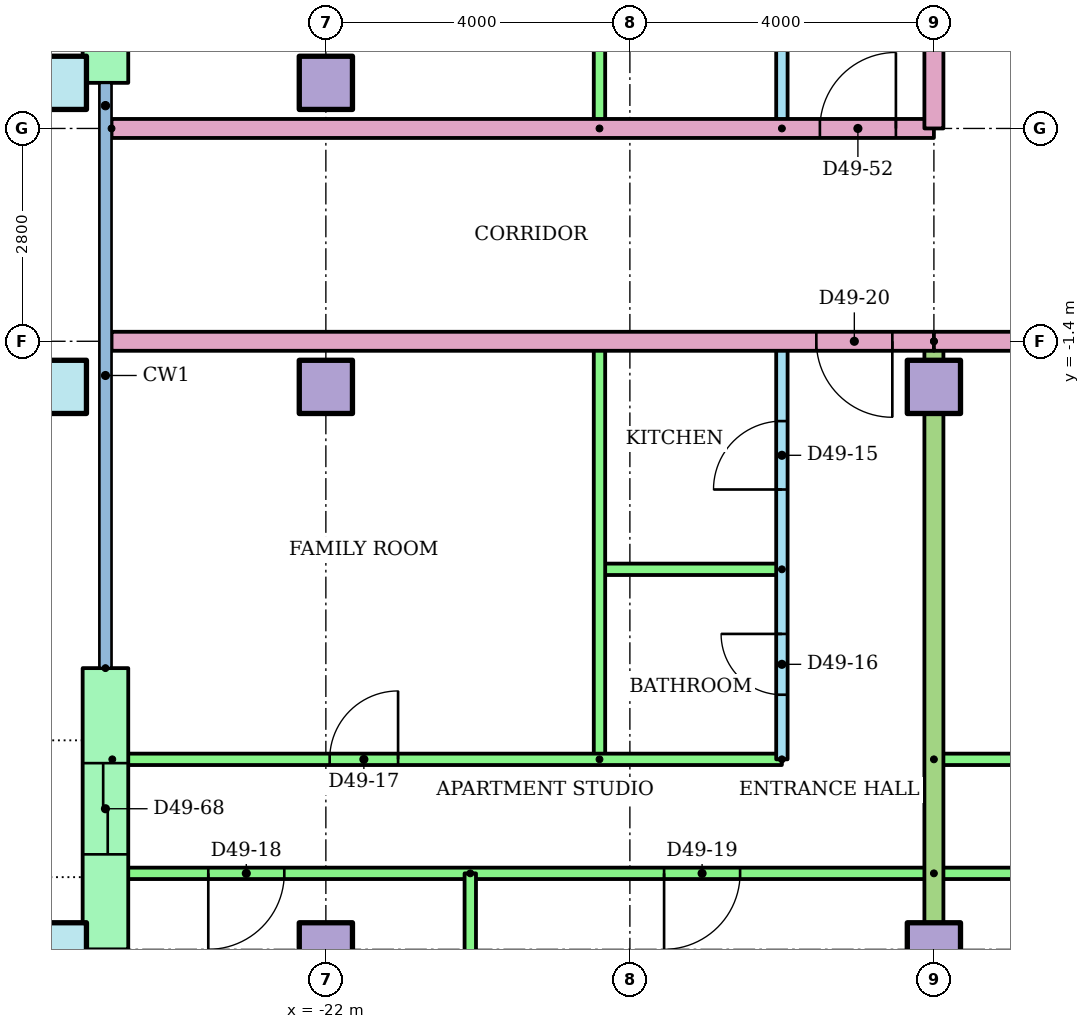
"""IFC4 building model, lengths in metres.
Left out: names, types, materials, properties, quantities, classifications, styles, units other than length and angle.
Written with IfcOpenShell. Run it as: python <this file> out.ifc"""

import sys

from ifc_helpers import new_model, si_unit, direction, frame, frame_2d, origin, origin_2d, place, context, subcontext, project, spatial, rectangle, hollow_rectangle, extrude, element, fill, save


model = new_model("IFC4")
c1 = context("Model", 3, precision=1e-05, world=origin(), true_north=direction((0.0, 1.0)))
c2 = subcontext(c1, "Body", "Model", "MODEL_VIEW")
j1 = project(units=[si_unit("LENGTHUNIT", "METRE"), si_unit("PLANEANGLEUNIT", "RADIAN")], contexts=[c1])
p1 = place(None, origin())
s1 = spatial("IfcSite", under=j1, at=p1, CompositionType="ELEMENT")
p2 = place(p1, origin())
s2 = spatial("IfcBuilding", under=s1, at=p2, CompositionType="ELEMENT")
p3 = place(p2, frame((0.0, 0.0, 187.7)))
s3 = spatial("IfcBuildingStorey", under=s2, at=p3, CompositionType="ELEMENT", Elevation=187.7)
p4 = place(p3, frame((-25.5, -9.4, 0.0)))
e1 = element("IfcColumn", 1, at=p4, inside=s3, PredefinedType="COLUMN", context=c2, shape_type="SweptSolid", body=[
    extrude(hollow_rectangle(XDim=0.7, YDim=0.7, WallThickness=0.036, at=origin_2d()), origin(), (0.0, 0.0, 1.0), 3.2),
])
for number, where in (
    (2, (-22.0, -9.4, 0.0)),
    (3, (-14.0, -9.4, 0.0)),
):
    element("IfcColumn", number, at=place(p3, frame(where)), inside=s3, PredefinedType="COLUMN", context=c2, shape_type="SweptSolid", body=[
        extrude(rectangle(XDim=0.7, YDim=0.7, at=origin_2d()), origin(), (0.0, 0.0, 1.0), 3.2),
    ])
p5 = place(p3, frame((-25.5, -2.0, 0.0)))
e4 = element("IfcColumn", 4, at=p5, inside=s3, PredefinedType="COLUMN", context=c2, shape_type="SweptSolid", body=[
    extrude(hollow_rectangle(XDim=0.7, YDim=0.7, WallThickness=0.036, at=origin_2d()), origin(), (0.0, 0.0, 1.0), 3.2),
])
for number, where in (
    (5, (-22.0, -2.0, 0.0)),
    (6, (-14.0, -2.0, 0.0)),
):
    element("IfcColumn", number, at=place(p3, frame(where)), inside=s3, PredefinedType="COLUMN", context=c2, shape_type="SweptSolid", body=[
        extrude(rectangle(XDim=0.7, YDim=0.7, at=origin_2d()), origin(), (0.0, 0.0, 1.0), 3.2),
    ])
p6 = place(p3, frame((-25.5, 2.0, 0.0)))
e7 = element("IfcColumn", 7, at=p6, inside=s3, PredefinedType="COLUMN", context=c2, shape_type="SweptSolid", body=[
    extrude(hollow_rectangle(XDim=0.7, YDim=0.7, WallThickness=0.036, at=origin_2d()), origin(), (0.0, 0.0, 1.0), 3.2),
])
p7 = place(p3, frame((-22.0, 2.0, 0.0)))
e8 = element("IfcColumn", 8, at=p7, inside=s3, PredefinedType="COLUMN", context=c2, shape_type="SweptSolid", body=[
    extrude(rectangle(XDim=0.7, YDim=0.7, at=origin_2d()), origin(), (0.0, 0.0, 1.0), 3.2),
])
p8 = place(p3, frame((-24.9, 6.5, 0.0), z_axis=(0.0, 0.0, 1.0), x_axis=(0.0, -1.0, 0.0)))
e9 = element("IfcWall", 9, at=p8, inside=s3, PredefinedType="STANDARD", context=c2, shape_type="SweptSolid", body=[
    extrude(rectangle(XDim=4.5, YDim=0.6, at=frame_2d((2.25, 0.0))), origin(), (0.0, 0.0, 1.0), 2.92),
])
p9 = place(p8, frame((1.65, 0.0, 0.0)))
e10 = element("IfcOpeningElement", 10, at=p9, cuts=e9, PredefinedType="OPENING", context=c2, shape_type="SweptSolid", body=[
    extrude(rectangle(XDim=1.2, YDim=2.1, at=frame_2d((0.6, 1.05))), frame((0.0, 0.31, 0.0), z_axis=(0.0, -1.0, 0.0), x_axis=(1.0, 0.0, 0.0)), (0.0, 0.0, 1.0), 0.62),
])
p10 = place(p3, frame((-24.9, -5.7, 0.0), z_axis=(0.0, 0.0, 1.0), x_axis=(0.0, -1.0, 0.0)))
e11 = element("IfcWall", 11, at=p10, inside=s3, PredefinedType="STANDARD", context=c2, shape_type="SweptSolid", body=[
    extrude(rectangle(XDim=3.7, YDim=0.6, at=frame_2d((1.85, 0.0))), origin(), (0.0, 0.0, 1.0), 2.92),
])
p11 = place(p10, frame((1.25, 0.0, 0.0)))
e12 = element("IfcOpeningElement", 12, at=p11, cuts=e11, PredefinedType="OPENING", context=c2, shape_type="SweptSolid", body=[
    extrude(rectangle(XDim=1.2, YDim=2.1, at=frame_2d((0.6, 1.05))), frame((0.0, 0.31, 0.0), z_axis=(0.0, -1.0, 0.0), x_axis=(1.0, 0.0, 0.0)), (0.0, 0.0, 1.0), 0.62),
])
p12 = place(p3, frame((-16.0, -6.9, 0.0), z_axis=(0.0, 0.0, 1.0), x_axis=(0.0, 1.0, 0.0)))
e13 = element("IfcWall", 13, at=p12, inside=s3, PredefinedType="PARTITIONING", context=c2, shape_type="SweptSolid", body=[
    extrude(rectangle(XDim=5.5, YDim=0.15, at=frame_2d((2.75, 0.0))), origin(), (0.0, 0.0, 1.0), 2.4),
])
p13 = place(p12, frame((3.55, 0.0, 0.0)))
e14 = element("IfcOpeningElement", 14, at=p13, cuts=e13, PredefinedType="OPENING", context=c2, shape_type="SweptSolid", body=[
    extrude(rectangle(XDim=0.9, YDim=2.1, at=frame_2d((0.45, 1.05))), frame((0.0, 0.085, 0.0), z_axis=(0.0, -1.0, 0.0), x_axis=(1.0, 0.0, 0.0)), (0.0, 0.0, 1.0), 0.17),
])
p14 = place(p12, frame((0.85, 0.0, 0.0)))
e15 = element("IfcOpeningElement", 15, at=p14, cuts=e13, PredefinedType="OPENING", context=c2, shape_type="SweptSolid", body=[
    extrude(rectangle(XDim=0.8, YDim=2.1, at=frame_2d((0.4, 1.05))), frame((0.0, 0.085, 0.0), z_axis=(0.0, -1.0, 0.0), x_axis=(1.0, 0.0, 0.0)), (0.0, 0.0, 1.0), 0.17),
])
p15 = place(p3, frame((-16.0, -4.4, 0.0), z_axis=(0.0, 0.0, 1.0), x_axis=(-1.0, 0.0, 0.0)))
e16 = element("IfcWall", 16, at=p15, inside=s3, PredefinedType="PARTITIONING", context=c2, shape_type="SweptSolid", body=[
    extrude(rectangle(XDim=2.4, YDim=0.15, at=frame_2d((1.2, 0.0))), origin(), (0.0, 0.0, 1.0), 2.4),
])
p16 = place(p3, frame((-18.4, -6.9, 0.0), z_axis=(0.0, 0.0, 1.0), x_axis=(0.0, 1.0, 0.0)))
e17 = element("IfcWall", 17, at=p16, inside=s3, PredefinedType="PARTITIONING", context=c2, shape_type="SweptSolid", body=[
    extrude(rectangle(XDim=5.5, YDim=0.15, at=frame_2d((2.75, 0.0))), origin(), (0.0, 0.0, 1.0), 2.4),
])
p17 = place(p3, frame((-24.81, -6.9, 0.0)))
e18 = element("IfcWall", 18, at=p17, inside=s3, PredefinedType="PARTITIONING", context=c2, shape_type="SweptSolid", body=[
    extrude(rectangle(XDim=8.81, YDim=0.15, at=frame_2d((4.405, 0.0))), origin(), (0.0, 0.0, 1.0), 2.4),
])
p18 = place(p17, frame((2.86, 0.0, 0.0)))
e19 = element("IfcOpeningElement", 19, at=p18, cuts=e18, PredefinedType="OPENING", context=c2, shape_type="SweptSolid", body=[
    extrude(rectangle(XDim=0.9, YDim=2.1, at=frame_2d((0.45, 1.05))), frame((0.0, 0.085, 0.0), z_axis=(0.0, -1.0, 0.0), x_axis=(1.0, 0.0, 0.0)), (0.0, 0.0, 1.0), 0.17),
])
p19 = place(p3, frame((-14.0, -8.4, 0.0), z_axis=(0.0, 0.0, 1.0), x_axis=(-1.0, 0.0, 0.0)))
e20 = element("IfcWall", 20, at=p19, inside=s3, PredefinedType="PARTITIONING", context=c2, shape_type="SweptSolid", body=[
    extrude(rectangle(XDim=10.81, YDim=0.15, at=frame_2d((5.405, 0.0))), origin(), (0.0, 0.0, 1.0), 2.4),
])
p20 = place(p19, frame((8.547, 0.0, 0.0)))
e21 = element("IfcOpeningElement", 21, at=p20, cuts=e20, PredefinedType="OPENING", context=c2, shape_type="SweptSolid", body=[
    extrude(rectangle(XDim=1.0, YDim=2.1, at=frame_2d((0.5, 1.05))), frame((0.0, 0.085, 0.0), z_axis=(0.0, -1.0, 0.0), x_axis=(1.0, 0.0, 0.0)), (0.0, 0.0, 1.0), 0.17),
])
p21 = place(p19, frame((2.55, 0.0, 0.0)))
e22 = element("IfcOpeningElement", 22, at=p21, cuts=e20, PredefinedType="OPENING", context=c2, shape_type="SweptSolid", body=[
    extrude(rectangle(XDim=1.0, YDim=2.1, at=frame_2d((0.5, 1.05))), frame((0.0, 0.085, 0.0), z_axis=(0.0, -1.0, 0.0), x_axis=(1.0, 0.0, 0.0)), (0.0, 0.0, 1.0), 0.17),
])
p22 = place(p3, frame((-20.1, -8.4, 0.0), z_axis=(0.0, 0.0, 1.0), x_axis=(0.0, -1.0, 0.0)))
e23 = element("IfcWall", 23, at=p22, inside=s3, PredefinedType="PARTITIONING", context=c2, shape_type="SweptSolid", body=[
    extrude(rectangle(XDim=6.22, YDim=0.15, at=frame_2d((3.11, 0.0))), origin(), (0.0, 0.0, 1.0), 2.4),
])
p23 = place(p3, frame((-14.0, -6.9, 0.0)))
e24 = element("IfcWall", 24, at=p23, inside=s3, PredefinedType="PARTITIONING", context=c2, shape_type="SweptSolid", body=[
    extrude(rectangle(XDim=22.0, YDim=0.15, at=frame_2d((11.0, 0.0))), origin(), (0.0, 0.0, 1.0), 2.4),
])
p24 = place(p23, frame((16.65, 0.0, 0.0)))
e25 = element("IfcOpeningElement", 25, at=p24, cuts=e24, PredefinedType="OPENING", context=c2, shape_type="SweptSolid", body=[
    extrude(rectangle(XDim=0.9, YDim=2.1, at=frame_2d((0.45, 1.05))), frame((0.0, 0.085, 0.0), z_axis=(0.0, -1.0, 0.0), x_axis=(1.0, 0.0, 0.0)), (0.0, 0.0, 1.0), 0.17),
])
p25 = place(p23, frame((10.9, 0.0, 0.0)))
e26 = element("IfcOpeningElement", 26, at=p25, cuts=e24, PredefinedType="OPENING", context=c2, shape_type="SweptSolid", body=[
    extrude(rectangle(XDim=0.9, YDim=2.1, at=frame_2d((0.45, 1.05))), frame((0.0, 0.085, 0.0), z_axis=(0.0, -1.0, 0.0), x_axis=(1.0, 0.0, 0.0)), (0.0, 0.0, 1.0), 0.17),
])
p26 = place(p23, frame((3.6, 0.0, 0.0)))
e27 = element("IfcOpeningElement", 27, at=p26, cuts=e24, PredefinedType="OPENING", context=c2, shape_type="SweptSolid", body=[
    extrude(rectangle(XDim=0.9, YDim=2.1, at=frame_2d((0.45, 1.05))), frame((0.0, 0.085, 0.0), z_axis=(0.0, -1.0, 0.0), x_axis=(1.0, 0.0, 0.0)), (0.0, 0.0, 1.0), 0.17),
])
p27 = place(p3, frame((10.0, -8.4, 0.0), z_axis=(0.0, 0.0, 1.0), x_axis=(-1.0, 0.0, 0.0)))
e28 = element("IfcWall", 28, at=p27, inside=s3, PredefinedType="PARTITIONING", context=c2, shape_type="SweptSolid", body=[
    extrude(rectangle(XDim=24.0, YDim=0.15, at=frame_2d((12.0, 0.0))), origin(), (0.0, 0.0, 1.0), 2.4),
])
p28 = place(p27, frame((19.5, 0.0, 0.0)))
e29 = element("IfcOpeningElement", 29, at=p28, cuts=e28, PredefinedType="OPENING", context=c2, shape_type="SweptSolid", body=[
    extrude(rectangle(XDim=1.0, YDim=2.1, at=frame_2d((0.5, 1.05))), frame((0.0, 0.085, 0.0), z_axis=(0.0, -1.0, 0.0), x_axis=(1.0, 0.0, 0.0)), (0.0, 0.0, 1.0), 0.17),
])
p29 = place(p27, frame((13.55, 0.0, 0.0)))
e30 = element("IfcOpeningElement", 30, at=p29, cuts=e28, PredefinedType="OPENING", context=c2, shape_type="SweptSolid", body=[
    extrude(rectangle(XDim=0.9, YDim=2.1, at=frame_2d((0.45, 1.05))), frame((0.0, 0.085, 0.0), z_axis=(0.0, -1.0, 0.0), x_axis=(1.0, 0.0, 0.0)), (0.0, 0.0, 1.0), 0.17),
])
p30 = place(p27, frame((9.55, 0.0, 0.0)))
e31 = element("IfcOpeningElement", 31, at=p30, cuts=e28, PredefinedType="OPENING", context=c2, shape_type="SweptSolid", body=[
    extrude(rectangle(XDim=0.9, YDim=2.1, at=frame_2d((0.45, 1.05))), frame((0.0, 0.085, 0.0), z_axis=(0.0, -1.0, 0.0), x_axis=(1.0, 0.0, 0.0)), (0.0, 0.0, 1.0), 0.17),
])
p31 = place(p27, frame((5.55, 0.0, 0.0)))
e32 = element("IfcOpeningElement", 32, at=p31, cuts=e28, PredefinedType="OPENING", context=c2, shape_type="SweptSolid", body=[
    extrude(rectangle(XDim=0.9, YDim=2.1, at=frame_2d((0.45, 1.05))), frame((0.0, 0.085, 0.0), z_axis=(0.0, -1.0, 0.0), x_axis=(1.0, 0.0, 0.0)), (0.0, 0.0, 1.0), 0.17),
])
p32 = place(p27, frame((1.55, 0.0, 0.0)))
e33 = element("IfcOpeningElement", 33, at=p32, cuts=e28, PredefinedType="OPENING", context=c2, shape_type="SweptSolid", body=[
    extrude(rectangle(XDim=0.9, YDim=2.1, at=frame_2d((0.45, 1.05))), frame((0.0, 0.085, 0.0), z_axis=(0.0, -1.0, 0.0), x_axis=(1.0, 0.0, 0.0)), (0.0, 0.0, 1.0), 0.17),
])
p33 = place(p3, frame((-14.0, -1.4, 0.0), z_axis=(0.0, 0.0, 1.0), x_axis=(0.0, -1.0, 0.0)))
e34 = element("IfcWall", 34, at=p33, inside=s3, PredefinedType="PARTITIONING", context=c2, shape_type="SweptSolid", body=[
    extrude(rectangle(XDim=15.01, YDim=0.25, at=frame_2d((7.505, 0.0))), origin(), (0.0, 0.0, 1.0), 2.4),
])
p34 = place(p3, frame((-14.0, -1.4, 0.0), z_axis=(0.0, 0.0, 1.0), x_axis=(-1.0, 0.0, 0.0)))
e35 = element("IfcWall", 35, at=p34, inside=s3, PredefinedType="PARTITIONING", context=c2, shape_type="SweptSolid", body=[
    extrude(rectangle(XDim=10.82, YDim=0.25, at=frame_2d((5.41, 0.0))), origin(), (0.0, 0.0, 1.0), 2.4),
])
p35 = place(p34, frame((0.547, 0.0, 0.0)))
e36 = element("IfcOpeningElement", 36, at=p35, cuts=e35, PredefinedType="OPENING", context=c2, shape_type="SweptSolid", body=[
    extrude(rectangle(XDim=1.0, YDim=2.1, at=frame_2d((0.5, 1.05))), frame((0.0, 0.135, 0.0), z_axis=(0.0, -1.0, 0.0), x_axis=(1.0, 0.0, 0.0)), (0.0, 0.0, 1.0), 0.27),
])
p36 = place(p3, frame((-16.0, 1.4, 0.0), z_axis=(0.0, 0.0, 1.0), x_axis=(0.0, 1.0, 0.0)))
e37 = element("IfcWall", 37, at=p36, inside=s3, PredefinedType="PARTITIONING", context=c2, shape_type="SweptSolid", body=[
    extrude(rectangle(XDim=7.9, YDim=0.15, at=frame_2d((3.95, 0.0))), origin(), (0.0, 0.0, 1.0), 2.4),
])
p37 = place(p36, frame((1.675, 0.0, 0.0)))
e38 = element("IfcOpeningElement", 38, at=p37, cuts=e37, PredefinedType="OPENING", context=c2, shape_type="SweptSolid", body=[
    extrude(rectangle(XDim=0.9, YDim=2.1, at=frame_2d((0.45, 1.05))), frame((0.0, 0.085, 0.0), z_axis=(0.0, -1.0, 0.0), x_axis=(1.0, 0.0, 0.0)), (0.0, 0.0, 1.0), 0.17),
])
p38 = place(p36, frame((5.675, 0.0, 0.0)))
e39 = element("IfcOpeningElement", 39, at=p38, cuts=e37, PredefinedType="OPENING", context=c2, shape_type="SweptSolid", body=[
    extrude(rectangle(XDim=0.8, YDim=2.1, at=frame_2d((0.4, 1.05))), frame((0.0, 0.085, 0.0), z_axis=(0.0, -1.0, 0.0), x_axis=(1.0, 0.0, 0.0)), (0.0, 0.0, 1.0), 0.17),
])
p39 = place(p3, frame((-18.4, 1.4, 0.0), z_axis=(0.0, 0.0, 1.0), x_axis=(0.0, 1.0, 0.0)))
e40 = element("IfcWall", 40, at=p39, inside=s3, PredefinedType="PARTITIONING", context=c2, shape_type="SweptSolid", body=[
    extrude(rectangle(XDim=7.9, YDim=0.15, at=frame_2d((3.95, 0.0))), origin(), (0.0, 0.0, 1.0), 2.4),
])
p40 = place(p3, frame((-24.82, 1.4, 0.0)))
e41 = element("IfcWall", 41, at=p40, inside=s3, PredefinedType="PARTITIONING", context=c2, shape_type="SweptSolid", body=[
    extrude(rectangle(XDim=10.82, YDim=0.25, at=frame_2d((5.41, 0.0))), origin(), (0.0, 0.0, 1.0), 2.4),
])
p41 = place(p40, frame((9.32, 0.0, 0.0)))
e42 = element("IfcOpeningElement", 42, at=p41, cuts=e41, PredefinedType="OPENING", context=c2, shape_type="SweptSolid", body=[
    extrude(rectangle(XDim=1.0, YDim=2.1, at=frame_2d((0.5, 1.05))), frame((0.0, 0.135, 0.0), z_axis=(0.0, -1.0, 0.0), x_axis=(1.0, 0.0, 0.0)), (0.0, 0.0, 1.0), 0.27),
])
p42 = place(p3, frame((14.0, -1.4, 0.0), z_axis=(0.0, 0.0, 1.0), x_axis=(-1.0, 0.0, 0.0)))
e43 = element("IfcWall", 43, at=p42, inside=s3, PredefinedType="PARTITIONING", context=c2, shape_type="SweptSolid", body=[
    extrude(rectangle(XDim=28.0, YDim=0.25, at=frame_2d((14.0, 0.0))), origin(), (0.0, 0.0, 1.0), 2.4),
])
p43 = place(p42, frame((4.547, 0.0, 0.0)))
e44 = element("IfcOpeningElement", 44, at=p43, cuts=e43, PredefinedType="OPENING", context=c2, shape_type="SweptSolid", body=[
    extrude(rectangle(XDim=1.0, YDim=2.1, at=frame_2d((0.5, 1.05))), frame((0.0, 0.135, 0.0), z_axis=(0.0, -1.0, 0.0), x_axis=(1.0, 0.0, 0.0)), (0.0, 0.0, 1.0), 0.27),
])
p44 = place(p42, frame((2.453, 0.0, 0.0)))
e45 = element("IfcOpeningElement", 45, at=p44, cuts=e43, PredefinedType="OPENING", context=c2, shape_type="SweptSolid", body=[
    extrude(rectangle(XDim=1.0, YDim=2.1, at=frame_2d((0.5, 1.05))), frame((0.0, 0.135, 0.0), z_axis=(0.0, -1.0, 0.0), x_axis=(1.0, 0.0, 0.0)), (0.0, 0.0, 1.0), 0.27),
])
p45 = place(p3, frame((-14.0, 3.0, 0.0), z_axis=(0.0, 0.0, 1.0), x_axis=(0.0, -1.0, 0.0)))
e46 = element("IfcWall", 46, at=p45, inside=s3, PredefinedType="PARTITIONING", context=c2, shape_type="SweptSolid", body=[
    extrude(rectangle(XDim=1.6, YDim=0.25, at=frame_2d((0.8, 0.0))), origin(), (0.0, 0.0, 1.0), 2.4),
])
p46 = place(p13, origin())
e47 = element("IfcDoor", 47, at=p46, inside=s3, OperationType="SINGLE_SWING_LEFT", PredefinedType="DOOR", context=c2, shape_type="SweptSolid", body=[
    extrude(rectangle(XDim=0.9, YDim=2.1, at=frame_2d((0.45, 1.05))), frame((0.0, 0.025, 0.0), z_axis=(0.0, -1.0, 0.0), x_axis=(1.0, 0.0, 0.0)), (0.0, 0.0, 1.0), 0.05),
])
fill(e14, e47)
p47 = place(p14, origin())
e48 = element("IfcDoor", 48, at=p47, inside=s3, OperationType="SINGLE_SWING_RIGHT", PredefinedType="DOOR", context=c2, shape_type="SweptSolid", body=[
    extrude(rectangle(XDim=0.8, YDim=2.1, at=frame_2d((0.4, 1.05))), frame((0.0, 0.025, 0.0), z_axis=(0.0, -1.0, 0.0), x_axis=(1.0, 0.0, 0.0)), (0.0, 0.0, 1.0), 0.05),
])
fill(e15, e48)
p48 = place(p18, origin())
e49 = element("IfcDoor", 49, at=p48, inside=s3, OperationType="SINGLE_SWING_RIGHT", PredefinedType="DOOR", context=c2, shape_type="SweptSolid", body=[
    extrude(rectangle(XDim=0.9, YDim=2.1, at=frame_2d((0.45, 1.05))), frame((0.0, 0.025, 0.0), z_axis=(0.0, -1.0, 0.0), x_axis=(1.0, 0.0, 0.0)), (0.0, 0.0, 1.0), 0.05),
])
fill(e19, e49)
p49 = place(p20, origin())
e50 = element("IfcDoor", 50, at=p49, inside=s3, OperationType="SINGLE_SWING_RIGHT", PredefinedType="DOOR", context=c2, shape_type="SweptSolid", body=[
    extrude(rectangle(XDim=1.0, YDim=2.1, at=frame_2d((0.5, 1.05))), frame((0.0, 0.025, 0.0), z_axis=(0.0, -1.0, 0.0), x_axis=(1.0, 0.0, 0.0)), (0.0, 0.0, 1.0), 0.05),
])
fill(e21, e50)
p50 = place(p21, origin())
e51 = element("IfcDoor", 51, at=p50, inside=s3, OperationType="SINGLE_SWING_RIGHT", PredefinedType="DOOR", context=c2, shape_type="SweptSolid", body=[
    extrude(rectangle(XDim=1.0, YDim=2.1, at=frame_2d((0.5, 1.05))), frame((0.0, 0.025, 0.0), z_axis=(0.0, -1.0, 0.0), x_axis=(1.0, 0.0, 0.0)), (0.0, 0.0, 1.0), 0.05),
])
fill(e22, e51)
p51 = place(p35, origin())
e52 = element("IfcDoor", 52, at=p51, inside=s3, OperationType="SINGLE_SWING_LEFT", PredefinedType="DOOR", context=c2, shape_type="SweptSolid", body=[
    extrude(rectangle(XDim=1.0, YDim=2.1, at=frame_2d((0.5, 1.05))), frame((0.0, 0.025, 0.0), z_axis=(0.0, -1.0, 0.0), x_axis=(1.0, 0.0, 0.0)), (0.0, 0.0, 1.0), 0.05),
])
fill(e36, e52)
p52 = place(p41, origin())
e53 = element("IfcDoor", 53, at=p52, inside=s3, OperationType="SINGLE_SWING_RIGHT", PredefinedType="DOOR", context=c2, shape_type="SweptSolid", body=[
    extrude(rectangle(XDim=1.0, YDim=2.1, at=frame_2d((0.5, 1.05))), frame((0.0, 0.025, 0.0), z_axis=(0.0, -1.0, 0.0), x_axis=(1.0, 0.0, 0.0)), (0.0, 0.0, 1.0), 0.05),
])
fill(e42, e53)
p53 = place(p11, origin())
e54 = element("IfcDoor", 54, at=p53, inside=s3, OperationType="SLIDING_TO_LEFT", PredefinedType="DOOR", context=c2, shape_type="SweptSolid", body=[
    extrude(rectangle(XDim=1.2, YDim=2.1, at=frame_2d((0.6, 1.05))), frame((0.0, 0.025, 0.0), z_axis=(0.0, -1.0, 0.0), x_axis=(1.0, 0.0, 0.0)), (0.0, 0.0, 1.0), 0.05),
])
fill(e12, e54)
save(model, sys.argv[1])
